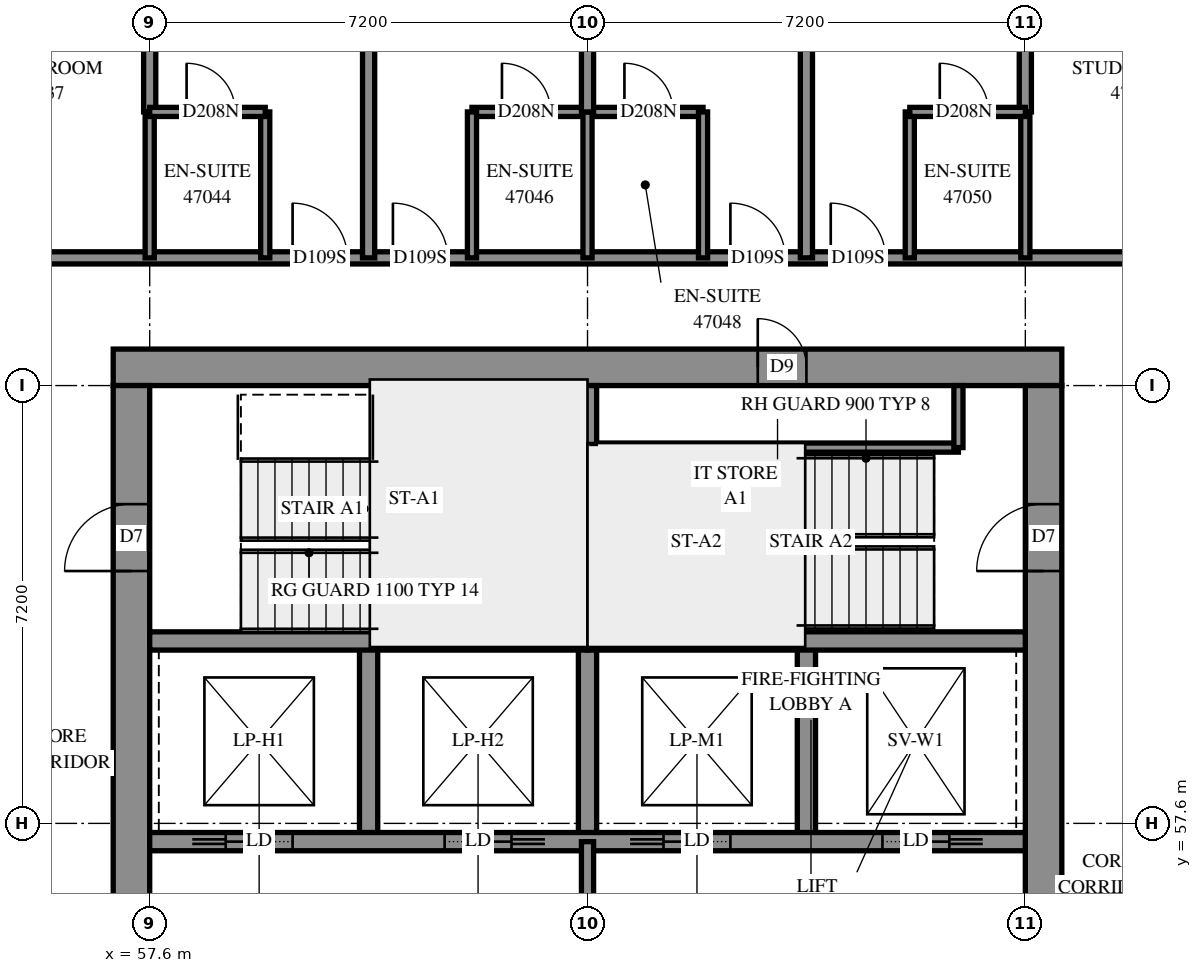
"""IFC4 building model, lengths in metres.
Left out: names, types, materials, properties, quantities, classifications, styles, units other than length and angle.
Written with IfcOpenShell. Run it as: python <this file> out.ifc"""

import sys

from ifc_helpers import new_model, si_unit, direction, frame, frame_2d, origin, place, context, subcontext, project, spatial, rectangle, extrude, element, fill, save


model = new_model("IFC4")
c1 = context("Model", 3, precision=1e-05, world=origin(), true_north=direction((0.0, 1.0)))
c2 = subcontext(c1, "Body", "Model", "MODEL_VIEW")
j1 = project(units=[si_unit("LENGTHUNIT", "METRE"), si_unit("PLANEANGLEUNIT", "RADIAN")], contexts=[c1])
p1 = place(None, origin())
s1 = spatial("IfcSite", under=j1, at=p1, CompositionType="ELEMENT")
p2 = place(p1, origin())
s2 = spatial("IfcBuilding", under=s1, at=p2, CompositionType="ELEMENT")
p3 = place(p2, frame((0.0, 0.0, 172.8)))
s3 = spatial("IfcBuildingStorey", under=s2, at=p3, CompositionType="ELEMENT", Elevation=172.8)
p4 = place(p3, frame((57.0, 65.1, -0.3), z_axis=(0.0, 0.0, 1.0), x_axis=(1.0, 0.0, 0.0)))
e1 = element("IfcWall", 1, at=p4, inside=s3, PredefinedType="SHEAR", context=c2, shape_type="SweptSolid", body=[
    extrude(rectangle(XDim=15.6, YDim=0.6, at=frame_2d((7.8, 0.0))), origin(), (0.0, 0.0, 1.0), 2.7),
])
p5 = place(p4, frame((10.6, 0.0, 0.3)))
e2 = element("IfcOpeningElement", 2, at=p5, cuts=e1, PredefinedType="OPENING", context=c2, shape_type="SweptSolid", body=[
    extrude(rectangle(XDim=0.8, YDim=2.1, at=frame_2d((0.4, 1.05))), frame((0.0, 0.31, 0.0), z_axis=(0.0, -1.0, 0.0), x_axis=(1.0, 0.0, 0.0)), (0.0, 0.0, 1.0), 0.62),
])
p6 = place(p3, frame((57.3, 50.4, -0.3), z_axis=(0.0, 0.0, 1.0), x_axis=(0.0, 1.0, 0.0)))
e3 = element("IfcWall", 3, at=p6, inside=s3, PredefinedType="SHEAR", context=c2, shape_type="SweptSolid", body=[
    extrude(rectangle(XDim=14.4, YDim=0.6, at=frame_2d((7.2, 0.0))), origin(), (0.0, 0.0, 1.0), 2.7),
])
p7 = place(p6, frame((4.55, 0.0, 0.3)))
e4 = element("IfcOpeningElement", 4, at=p7, cuts=e3, PredefinedType="OPENING", context=c2, shape_type="SweptSolid", body=[
    extrude(rectangle(XDim=1.1, YDim=2.1, at=frame_2d((0.55, 1.05))), frame((0.0, 0.31, 0.0), z_axis=(0.0, -1.0, 0.0), x_axis=(1.0, 0.0, 0.0)), (0.0, 0.0, 1.0), 0.62),
])
p8 = place(p6, frame((11.35, 0.0, 0.3)))
e5 = element("IfcOpeningElement", 5, at=p8, cuts=e3, PredefinedType="OPENING", context=c2, shape_type="SweptSolid", body=[
    extrude(rectangle(XDim=1.1, YDim=2.1, at=frame_2d((0.55, 1.05))), frame((0.0, 0.31, 0.0), z_axis=(0.0, -1.0, 0.0), x_axis=(1.0, 0.0, 0.0)), (0.0, 0.0, 1.0), 0.62),
])
p9 = place(p3, frame((72.3, 50.4, -0.3), z_axis=(0.0, 0.0, 1.0), x_axis=(0.0, 1.0, 0.0)))
e6 = element("IfcWall", 6, at=p9, inside=s3, PredefinedType="SHEAR", context=c2, shape_type="SweptSolid", body=[
    extrude(rectangle(XDim=14.4, YDim=0.6, at=frame_2d((7.2, 0.0))), origin(), (0.0, 0.0, 1.0), 2.7),
])
p10 = place(p9, frame((4.55, 0.0, 0.3)))
e7 = element("IfcOpeningElement", 7, at=p10, cuts=e6, PredefinedType="OPENING", context=c2, shape_type="SweptSolid", body=[
    extrude(rectangle(XDim=1.1, YDim=2.1, at=frame_2d((0.55, 1.05))), frame((0.0, 0.31, 0.0), z_axis=(0.0, -1.0, 0.0), x_axis=(1.0, 0.0, 0.0)), (0.0, 0.0, 1.0), 0.62),
])
p11 = place(p9, frame((11.35, 0.0, 0.3)))
e8 = element("IfcOpeningElement", 8, at=p11, cuts=e6, PredefinedType="OPENING", context=c2, shape_type="SweptSolid", body=[
    extrude(rectangle(XDim=1.1, YDim=2.1, at=frame_2d((0.55, 1.05))), frame((0.0, 0.31, 0.0), z_axis=(0.0, -1.0, 0.0), x_axis=(1.0, 0.0, 0.0)), (0.0, 0.0, 1.0), 0.62),
])
for number, where, z_axis, x_axis in (
    (9, (61.2, 57.3, 0.0), (0.0, 0.0, 1.0), (0.0, 1.0, 0.0)),
    (10, (64.8, 57.3, 0.0), (0.0, 0.0, 1.0), (0.0, 1.0, 0.0)),
    (11, (68.4, 57.3, 0.0), (0.0, 0.0, 1.0), (0.0, 1.0, 0.0)),
):
    element("IfcWall", number, at=place(p3, frame(where, z_axis=z_axis, x_axis=x_axis)), inside=s3, PredefinedType="SOLIDWALL", context=c2, shape_type="SweptSolid", body=[
        extrude(rectangle(XDim=3.3, YDim=0.3, at=frame_2d((1.65, 0.0))), origin(), (0.0, 0.0, 1.0), 3.1),
    ])
p12 = place(p3, frame((57.6, 57.3, 0.0), z_axis=(0.0, 0.0, 1.0), x_axis=(1.0, 0.0, 0.0)))
e12 = element("IfcWall", 12, at=p12, inside=s3, PredefinedType="SOLIDWALL", context=c2, shape_type="SweptSolid", body=[
    extrude(rectangle(XDim=14.4, YDim=0.3, at=frame_2d((7.2, 0.0))), origin(), (0.0, 0.0, 1.0), 3.1),
])
p13 = place(p12, frame((1.25, 0.0, 0.0)))
e13 = element("IfcOpeningElement", 13, at=p13, cuts=e12, PredefinedType="OPENING", context=c2, shape_type="SweptSolid", body=[
    extrude(rectangle(XDim=1.1, YDim=2.1, at=frame_2d((0.55, 1.05))), frame((0.0, 0.16, 0.0), z_axis=(0.0, -1.0, 0.0), x_axis=(1.0, 0.0, 0.0)), (0.0, 0.0, 1.0), 0.32),
])
p14 = place(p12, frame((4.85, 0.0, 0.0)))
e14 = element("IfcOpeningElement", 14, at=p14, cuts=e12, PredefinedType="OPENING", context=c2, shape_type="SweptSolid", body=[
    extrude(rectangle(XDim=1.1, YDim=2.1, at=frame_2d((0.55, 1.05))), frame((0.0, 0.16, 0.0), z_axis=(0.0, -1.0, 0.0), x_axis=(1.0, 0.0, 0.0)), (0.0, 0.0, 1.0), 0.32),
])
p15 = place(p12, frame((8.45, 0.0, 0.0)))
e15 = element("IfcOpeningElement", 15, at=p15, cuts=e12, PredefinedType="OPENING", context=c2, shape_type="SweptSolid", body=[
    extrude(rectangle(XDim=1.1, YDim=2.1, at=frame_2d((0.55, 1.05))), frame((0.0, 0.16, 0.0), z_axis=(0.0, -1.0, 0.0), x_axis=(1.0, 0.0, 0.0)), (0.0, 0.0, 1.0), 0.32),
])
p16 = place(p12, frame((12.05, 0.0, 0.0)))
e16 = element("IfcOpeningElement", 16, at=p16, cuts=e12, PredefinedType="OPENING", context=c2, shape_type="SweptSolid", body=[
    extrude(rectangle(XDim=1.1, YDim=2.1, at=frame_2d((0.55, 1.05))), frame((0.0, 0.16, 0.0), z_axis=(0.0, -1.0, 0.0), x_axis=(1.0, 0.0, 0.0)), (0.0, 0.0, 1.0), 0.32),
])
for number, where, z_axis, x_axis in (
    (17, (57.6, 60.6, 0.0), (0.0, 0.0, 1.0), (1.0, 0.0, 0.0)),
    (18, (64.8, 60.6, 0.0), (0.0, 0.0, 1.0), (1.0, 0.0, 0.0)),
):
    element("IfcWall", number, at=place(p3, frame(where, z_axis=z_axis, x_axis=x_axis)), inside=s3, PredefinedType="SOLIDWALL", context=c2, shape_type="SweptSolid", body=[
        extrude(rectangle(XDim=7.2, YDim=0.3, at=frame_2d((3.6, 0.0))), origin(), (0.0, 0.0, 1.0), 3.1),
    ])
p17 = place(p3, frame((64.8, 60.6, 0.0), z_axis=(0.0, 0.0, 1.0), x_axis=(0.0, 1.0, 0.0)))
e19 = element("IfcWall", 19, at=p17, inside=s3, PredefinedType="SOLIDWALL", context=c2, shape_type="SweptSolid", body=[
    extrude(rectangle(XDim=4.2, YDim=0.3, at=frame_2d((2.1, 0.0))), origin(), (0.0, 0.0, 1.0), 3.1),
])
p18 = place(p3, frame((64.95, 63.78, 0.0), z_axis=(0.0, 0.0, 1.0), x_axis=(1.0, 0.0, 0.0)))
e20 = element("IfcWall", 20, at=p18, inside=s3, PredefinedType="PARTITIONING", context=c2, shape_type="SweptSolid", body=[
    extrude(rectangle(XDim=5.95, YDim=0.15, at=frame_2d((2.975, 0.0))), origin(), (0.0, 0.0, 1.0), 3.1),
])
p19 = place(p3, frame((70.9, 63.78, 0.0), z_axis=(0.0, 0.0, 1.0), x_axis=(0.0, 1.0, 0.0)))
e21 = element("IfcWall", 21, at=p19, inside=s3, PredefinedType="PARTITIONING", context=c2, shape_type="SweptSolid", body=[
    extrude(rectangle(XDim=1.02, YDim=0.15, at=frame_2d((0.51, 0.0))), origin(), (0.0, 0.0, 1.0), 3.1),
])
p20 = place(p3, frame((64.8, 53.7, 0.0), z_axis=(0.0, 0.0, 1.0), x_axis=(0.0, 1.0, 0.0)))
e22 = element("IfcWall", 22, at=p20, inside=s3, PredefinedType="PARTITIONING", context=c2, shape_type="SweptSolid", body=[
    extrude(rectangle(XDim=3.6, YDim=0.2, at=frame_2d((1.8, 0.0))), origin(), (0.0, 0.0, 1.0), 3.1),
])
p21 = place(p3, frame((55.5, 66.9, 0.0), z_axis=(0.0, 0.0, 1.0), x_axis=(1.0, 0.0, 0.0)))
e23 = element("IfcWall", 23, at=p21, inside=s3, PredefinedType="PARTITIONING", context=c2, shape_type="SweptSolid", body=[
    extrude(rectangle(XDim=18.6, YDim=0.2, at=frame_2d((9.3, 0.0))), origin(), (0.0, 0.0, 1.0), 3.1),
])
p22 = place(p21, frame((4.45, 0.0, 0.0)))
e24 = element("IfcOpeningElement", 24, at=p22, cuts=e23, PredefinedType="OPENING", context=c2, shape_type="SweptSolid", body=[
    extrude(rectangle(XDim=0.9, YDim=2.1, at=frame_2d((0.45, 1.05))), frame((0.0, 0.11, 0.0), z_axis=(0.0, -1.0, 0.0), x_axis=(1.0, 0.0, 0.0)), (0.0, 0.0, 1.0), 0.22),
])
p23 = place(p21, frame((6.1, 0.0, 0.0)))
e25 = element("IfcOpeningElement", 25, at=p23, cuts=e23, PredefinedType="OPENING", context=c2, shape_type="SweptSolid", body=[
    extrude(rectangle(XDim=0.9, YDim=2.1, at=frame_2d((0.45, 1.05))), frame((0.0, 0.11, 0.0), z_axis=(0.0, -1.0, 0.0), x_axis=(1.0, 0.0, 0.0)), (0.0, 0.0, 1.0), 0.22),
])
p24 = place(p21, frame((11.65, 0.0, 0.0)))
e26 = element("IfcOpeningElement", 26, at=p24, cuts=e23, PredefinedType="OPENING", context=c2, shape_type="SweptSolid", body=[
    extrude(rectangle(XDim=0.9, YDim=2.1, at=frame_2d((0.45, 1.05))), frame((0.0, 0.11, 0.0), z_axis=(0.0, -1.0, 0.0), x_axis=(1.0, 0.0, 0.0)), (0.0, 0.0, 1.0), 0.22),
])
p25 = place(p21, frame((13.3, 0.0, 0.0)))
e27 = element("IfcOpeningElement", 27, at=p25, cuts=e23, PredefinedType="OPENING", context=c2, shape_type="SweptSolid", body=[
    extrude(rectangle(XDim=0.9, YDim=2.1, at=frame_2d((0.45, 1.05))), frame((0.0, 0.11, 0.0), z_axis=(0.0, -1.0, 0.0), x_axis=(1.0, 0.0, 0.0)), (0.0, 0.0, 1.0), 0.22),
])
p26 = place(p3, frame((68.4, 66.9, 0.0), z_axis=(0.0, 0.0, 1.0), x_axis=(0.0, 1.0, 0.0)))
e28 = element("IfcWall", 28, at=p26, inside=s3, PredefinedType="PARTITIONING", context=c2, shape_type="SweptSolid", body=[
    extrude(rectangle(XDim=5.853, YDim=0.2, at=frame_2d((2.926, 0.0))), origin(), (0.0, 0.0, 1.0), 3.1),
])
p27 = place(p3, frame((61.2, 66.9, 0.0), z_axis=(0.0, 0.0, 1.0), x_axis=(0.0, 1.0, 0.0)))
e29 = element("IfcWall", 29, at=p27, inside=s3, PredefinedType="PARTITIONING", context=c2, shape_type="SweptSolid", body=[
    extrude(rectangle(XDim=5.805, YDim=0.2, at=frame_2d((2.902, 0.0))), origin(), (0.0, 0.0, 1.0), 3.1),
])
p28 = place(p3, frame((62.9, 69.3, 0.0), z_axis=(0.0, 0.0, 1.0), x_axis=(1.0, 0.0, 0.0)))
e30 = element("IfcWall", 30, at=p28, inside=s3, PredefinedType="PARTITIONING", context=c2, shape_type="SweptSolid", body=[
    extrude(rectangle(XDim=3.8, YDim=0.15, at=frame_2d((1.9, 0.0))), origin(), (0.0, 0.0, 1.0), 3.1),
])
p29 = place(p28, frame((0.493, 0.0, 0.0)))
e31 = element("IfcOpeningElement", 31, at=p29, cuts=e30, PredefinedType="OPENING", context=c2, shape_type="SweptSolid", body=[
    extrude(rectangle(XDim=0.8, YDim=2.1, at=frame_2d((0.4, 1.05))), frame((0.0, 0.085, 0.0), z_axis=(0.0, -1.0, 0.0), x_axis=(1.0, 0.0, 0.0)), (0.0, 0.0, 1.0), 0.17),
])
p30 = place(p28, frame((2.507, 0.0, 0.0)))
e32 = element("IfcOpeningElement", 32, at=p30, cuts=e30, PredefinedType="OPENING", context=c2, shape_type="SweptSolid", body=[
    extrude(rectangle(XDim=0.8, YDim=2.1, at=frame_2d((0.4, 1.05))), frame((0.0, 0.085, 0.0), z_axis=(0.0, -1.0, 0.0), x_axis=(1.0, 0.0, 0.0)), (0.0, 0.0, 1.0), 0.17),
])
for number, where, z_axis, x_axis in (
    (33, (57.6, 66.9, 0.0), (0.0, 0.0, 1.0), (0.0, 1.0, 0.0)),
    (34, (59.5, 66.9, 0.0), (0.0, 0.0, 1.0), (0.0, 1.0, 0.0)),
    (35, (62.9, 66.9, 0.0), (0.0, 0.0, 1.0), (0.0, 1.0, 0.0)),
    (36, (64.8, 66.9, 0.0), (0.0, 0.0, 1.0), (0.0, 1.0, 0.0)),
    (37, (66.7, 66.9, 0.0), (0.0, 0.0, 1.0), (0.0, 1.0, 0.0)),
    (38, (70.1, 66.9, 0.0), (0.0, 0.0, 1.0), (0.0, 1.0, 0.0)),
    (39, (72.0, 66.9, 0.0), (0.0, 0.0, 1.0), (0.0, 1.0, 0.0)),
):
    element("IfcWall", number, at=place(p3, frame(where, z_axis=z_axis, x_axis=x_axis)), inside=s3, PredefinedType="PARTITIONING", context=c2, shape_type="SweptSolid", body=[
        extrude(rectangle(XDim=2.4, YDim=0.15, at=frame_2d((1.2, 0.0))), origin(), (0.0, 0.0, 1.0), 3.1),
    ])
for number, where, z_axis, x_axis in (
    (40, (57.6, 69.3, 0.0), (0.0, 0.0, 1.0), (0.0, 1.0, 0.0)),
    (41, (64.8, 69.3, 0.0), (0.0, 0.0, 1.0), (0.0, 1.0, 0.0)),
    (42, (72.0, 69.3, 0.0), (0.0, 0.0, 1.0), (0.0, 1.0, 0.0)),
):
    element("IfcWall", number, at=place(p3, frame(where, z_axis=z_axis, x_axis=x_axis)), inside=s3, PredefinedType="PARTITIONING", context=c2, shape_type="SweptSolid", body=[
        extrude(rectangle(XDim=2.25, YDim=0.2, at=frame_2d((1.125, 0.0))), origin(), (0.0, 0.0, 1.0), 3.1),
    ])
p31 = place(p3, frame((70.1, 69.3, 0.0), z_axis=(0.0, 0.0, 1.0), x_axis=(1.0, 0.0, 0.0)))
e43 = element("IfcWall", 43, at=p31, inside=s3, PredefinedType="PARTITIONING", context=c2, shape_type="SweptSolid", body=[
    extrude(rectangle(XDim=1.9, YDim=0.15, at=frame_2d((0.95, 0.0))), origin(), (0.0, 0.0, 1.0), 3.1),
])
p32 = place(p31, frame((0.493, 0.0, 0.0)))
e44 = element("IfcOpeningElement", 44, at=p32, cuts=e43, PredefinedType="OPENING", context=c2, shape_type="SweptSolid", body=[
    extrude(rectangle(XDim=0.8, YDim=2.1, at=frame_2d((0.4, 1.05))), frame((0.0, 0.085, 0.0), z_axis=(0.0, -1.0, 0.0), x_axis=(1.0, 0.0, 0.0)), (0.0, 0.0, 1.0), 0.17),
])
p33 = place(p3, frame((57.6, 69.3, 0.0), z_axis=(0.0, 0.0, 1.0), x_axis=(1.0, 0.0, 0.0)))
e45 = element("IfcWall", 45, at=p33, inside=s3, PredefinedType="PARTITIONING", context=c2, shape_type="SweptSolid", body=[
    extrude(rectangle(XDim=1.9, YDim=0.15, at=frame_2d((0.95, 0.0))), origin(), (0.0, 0.0, 1.0), 3.1),
])
p34 = place(p33, frame((0.607, 0.0, 0.0)))
e46 = element("IfcOpeningElement", 46, at=p34, cuts=e45, PredefinedType="OPENING", context=c2, shape_type="SweptSolid", body=[
    extrude(rectangle(XDim=0.8, YDim=2.1, at=frame_2d((0.4, 1.05))), frame((0.0, 0.085, 0.0), z_axis=(0.0, -1.0, 0.0), x_axis=(1.0, 0.0, 0.0)), (0.0, 0.0, 1.0), 0.17),
])
p35 = place(p5, origin())
e47 = element("IfcDoor", 47, at=p35, inside=s3, OperationType="SINGLE_SWING_RIGHT", PredefinedType="DOOR", context=c2, shape_type="SweptSolid", body=[
    extrude(rectangle(XDim=0.8, YDim=2.1, at=frame_2d((0.4, 1.05))), frame((0.0, 0.025, 0.0), z_axis=(0.0, -1.0, 0.0), x_axis=(1.0, 0.0, 0.0)), (0.0, 0.0, 1.0), 0.05),
])
fill(e2, e47)
p36 = place(p8, origin())
e48 = element("IfcDoor", 48, at=p36, inside=s3, OperationType="SINGLE_SWING_LEFT", PredefinedType="DOOR", context=c2, shape_type="SweptSolid", body=[
    extrude(rectangle(XDim=1.1, YDim=2.1, at=frame_2d((0.55, 1.05))), frame((0.0, 0.025, 0.0), z_axis=(0.0, -1.0, 0.0), x_axis=(1.0, 0.0, 0.0)), (0.0, 0.0, 1.0), 0.05),
])
fill(e5, e48)
p37 = place(p11, origin())
e49 = element("IfcDoor", 49, at=p37, inside=s3, OperationType="SINGLE_SWING_RIGHT", PredefinedType="DOOR", context=c2, shape_type="SweptSolid", body=[
    extrude(rectangle(XDim=1.1, YDim=2.1, at=frame_2d((0.55, 1.05))), frame((0.0, 0.025, 0.0), z_axis=(0.0, -1.0, 0.0), x_axis=(1.0, 0.0, 0.0)), (0.0, 0.0, 1.0), 0.05),
])
fill(e8, e49)
p38 = place(p13, origin())
e50 = element("IfcDoor", 50, at=p38, inside=s3, OperationType="SLIDING_TO_LEFT", PredefinedType="DOOR", context=c2, shape_type="SweptSolid", body=[
    extrude(rectangle(XDim=1.1, YDim=2.1, at=frame_2d((0.55, 1.05))), frame((0.0, 0.025, 0.0), z_axis=(0.0, -1.0, 0.0), x_axis=(1.0, 0.0, 0.0)), (0.0, 0.0, 1.0), 0.05),
])
fill(e13, e50)
p39 = place(p14, origin())
e51 = element("IfcDoor", 51, at=p39, inside=s3, OperationType="SLIDING_TO_RIGHT", PredefinedType="DOOR", context=c2, shape_type="SweptSolid", body=[
    extrude(rectangle(XDim=1.1, YDim=2.1, at=frame_2d((0.55, 1.05))), frame((0.0, 0.025, 0.0), z_axis=(0.0, -1.0, 0.0), x_axis=(1.0, 0.0, 0.0)), (0.0, 0.0, 1.0), 0.05),
])
fill(e14, e51)
p40 = place(p15, origin())
e52 = element("IfcDoor", 52, at=p40, inside=s3, OperationType="SLIDING_TO_LEFT", PredefinedType="DOOR", context=c2, shape_type="SweptSolid", body=[
    extrude(rectangle(XDim=1.1, YDim=2.1, at=frame_2d((0.55, 1.05))), frame((0.0, 0.025, 0.0), z_axis=(0.0, -1.0, 0.0), x_axis=(1.0, 0.0, 0.0)), (0.0, 0.0, 1.0), 0.05),
])
fill(e15, e52)
p41 = place(p16, origin())
e53 = element("IfcDoor", 53, at=p41, inside=s3, OperationType="SLIDING_TO_RIGHT", PredefinedType="DOOR", context=c2, shape_type="SweptSolid", body=[
    extrude(rectangle(XDim=1.1, YDim=2.1, at=frame_2d((0.55, 1.05))), frame((0.0, 0.025, 0.0), z_axis=(0.0, -1.0, 0.0), x_axis=(1.0, 0.0, 0.0)), (0.0, 0.0, 1.0), 0.05),
])
fill(e16, e53)
p42 = place(p22, origin())
e54 = element("IfcDoor", 54, at=p42, inside=s3, OperationType="SINGLE_SWING_RIGHT", PredefinedType="DOOR", context=c2, shape_type="SweptSolid", body=[
    extrude(rectangle(XDim=0.9, YDim=2.1, at=frame_2d((0.45, 1.05))), frame((0.0, 0.025, 0.0), z_axis=(0.0, -1.0, 0.0), x_axis=(1.0, 0.0, 0.0)), (0.0, 0.0, 1.0), 0.05),
])
fill(e24, e54)
p43 = place(p34, origin())
e55 = element("IfcDoor", 55, at=p43, inside=s3, OperationType="SINGLE_SWING_RIGHT", PredefinedType="DOOR", context=c2, shape_type="SweptSolid", body=[
    extrude(rectangle(XDim=0.8, YDim=2.1, at=frame_2d((0.4, 1.05))), frame((0.0, 0.025, 0.0), z_axis=(0.0, -1.0, 0.0), x_axis=(1.0, 0.0, 0.0)), (0.0, 0.0, 1.0), 0.05),
])
fill(e46, e55)
p44 = place(p23, origin())
e56 = element("IfcDoor", 56, at=p44, inside=s3, OperationType="SINGLE_SWING_LEFT", PredefinedType="DOOR", context=c2, shape_type="SweptSolid", body=[
    extrude(rectangle(XDim=0.9, YDim=2.1, at=frame_2d((0.45, 1.05))), frame((0.0, 0.025, 0.0), z_axis=(0.0, -1.0, 0.0), x_axis=(1.0, 0.0, 0.0)), (0.0, 0.0, 1.0), 0.05),
])
fill(e25, e56)
p45 = place(p29, origin())
e57 = element("IfcDoor", 57, at=p45, inside=s3, OperationType="SINGLE_SWING_RIGHT", PredefinedType="DOOR", context=c2, shape_type="SweptSolid", body=[
    extrude(rectangle(XDim=0.8, YDim=2.1, at=frame_2d((0.4, 1.05))), frame((0.0, 0.025, 0.0), z_axis=(0.0, -1.0, 0.0), x_axis=(1.0, 0.0, 0.0)), (0.0, 0.0, 1.0), 0.05),
])
fill(e31, e57)
p46 = place(p24, origin())
e58 = element("IfcDoor", 58, at=p46, inside=s3, OperationType="SINGLE_SWING_RIGHT", PredefinedType="DOOR", context=c2, shape_type="SweptSolid", body=[
    extrude(rectangle(XDim=0.9, YDim=2.1, at=frame_2d((0.45, 1.05))), frame((0.0, 0.025, 0.0), z_axis=(0.0, -1.0, 0.0), x_axis=(1.0, 0.0, 0.0)), (0.0, 0.0, 1.0), 0.05),
])
fill(e26, e58)
p47 = place(p30, origin())
e59 = element("IfcDoor", 59, at=p47, inside=s3, OperationType="SINGLE_SWING_RIGHT", PredefinedType="DOOR", context=c2, shape_type="SweptSolid", body=[
    extrude(rectangle(XDim=0.8, YDim=2.1, at=frame_2d((0.4, 1.05))), frame((0.0, 0.025, 0.0), z_axis=(0.0, -1.0, 0.0), x_axis=(1.0, 0.0, 0.0)), (0.0, 0.0, 1.0), 0.05),
])
fill(e32, e59)
p48 = place(p25, origin())
e60 = element("IfcDoor", 60, at=p48, inside=s3, OperationType="SINGLE_SWING_LEFT", PredefinedType="DOOR", context=c2, shape_type="SweptSolid", body=[
    extrude(rectangle(XDim=0.9, YDim=2.1, at=frame_2d((0.45, 1.05))), frame((0.0, 0.025, 0.0), z_axis=(0.0, -1.0, 0.0), x_axis=(1.0, 0.0, 0.0)), (0.0, 0.0, 1.0), 0.05),
])
fill(e27, e60)
p49 = place(p32, origin())
e61 = element("IfcDoor", 61, at=p49, inside=s3, OperationType="SINGLE_SWING_RIGHT", PredefinedType="DOOR", context=c2, shape_type="SweptSolid", body=[
    extrude(rectangle(XDim=0.8, YDim=2.1, at=frame_2d((0.4, 1.05))), frame((0.0, 0.025, 0.0), z_axis=(0.0, -1.0, 0.0), x_axis=(1.0, 0.0, 0.0)), (0.0, 0.0, 1.0), 0.05),
])
fill(e44, e61)
save(model, sys.argv[1])
